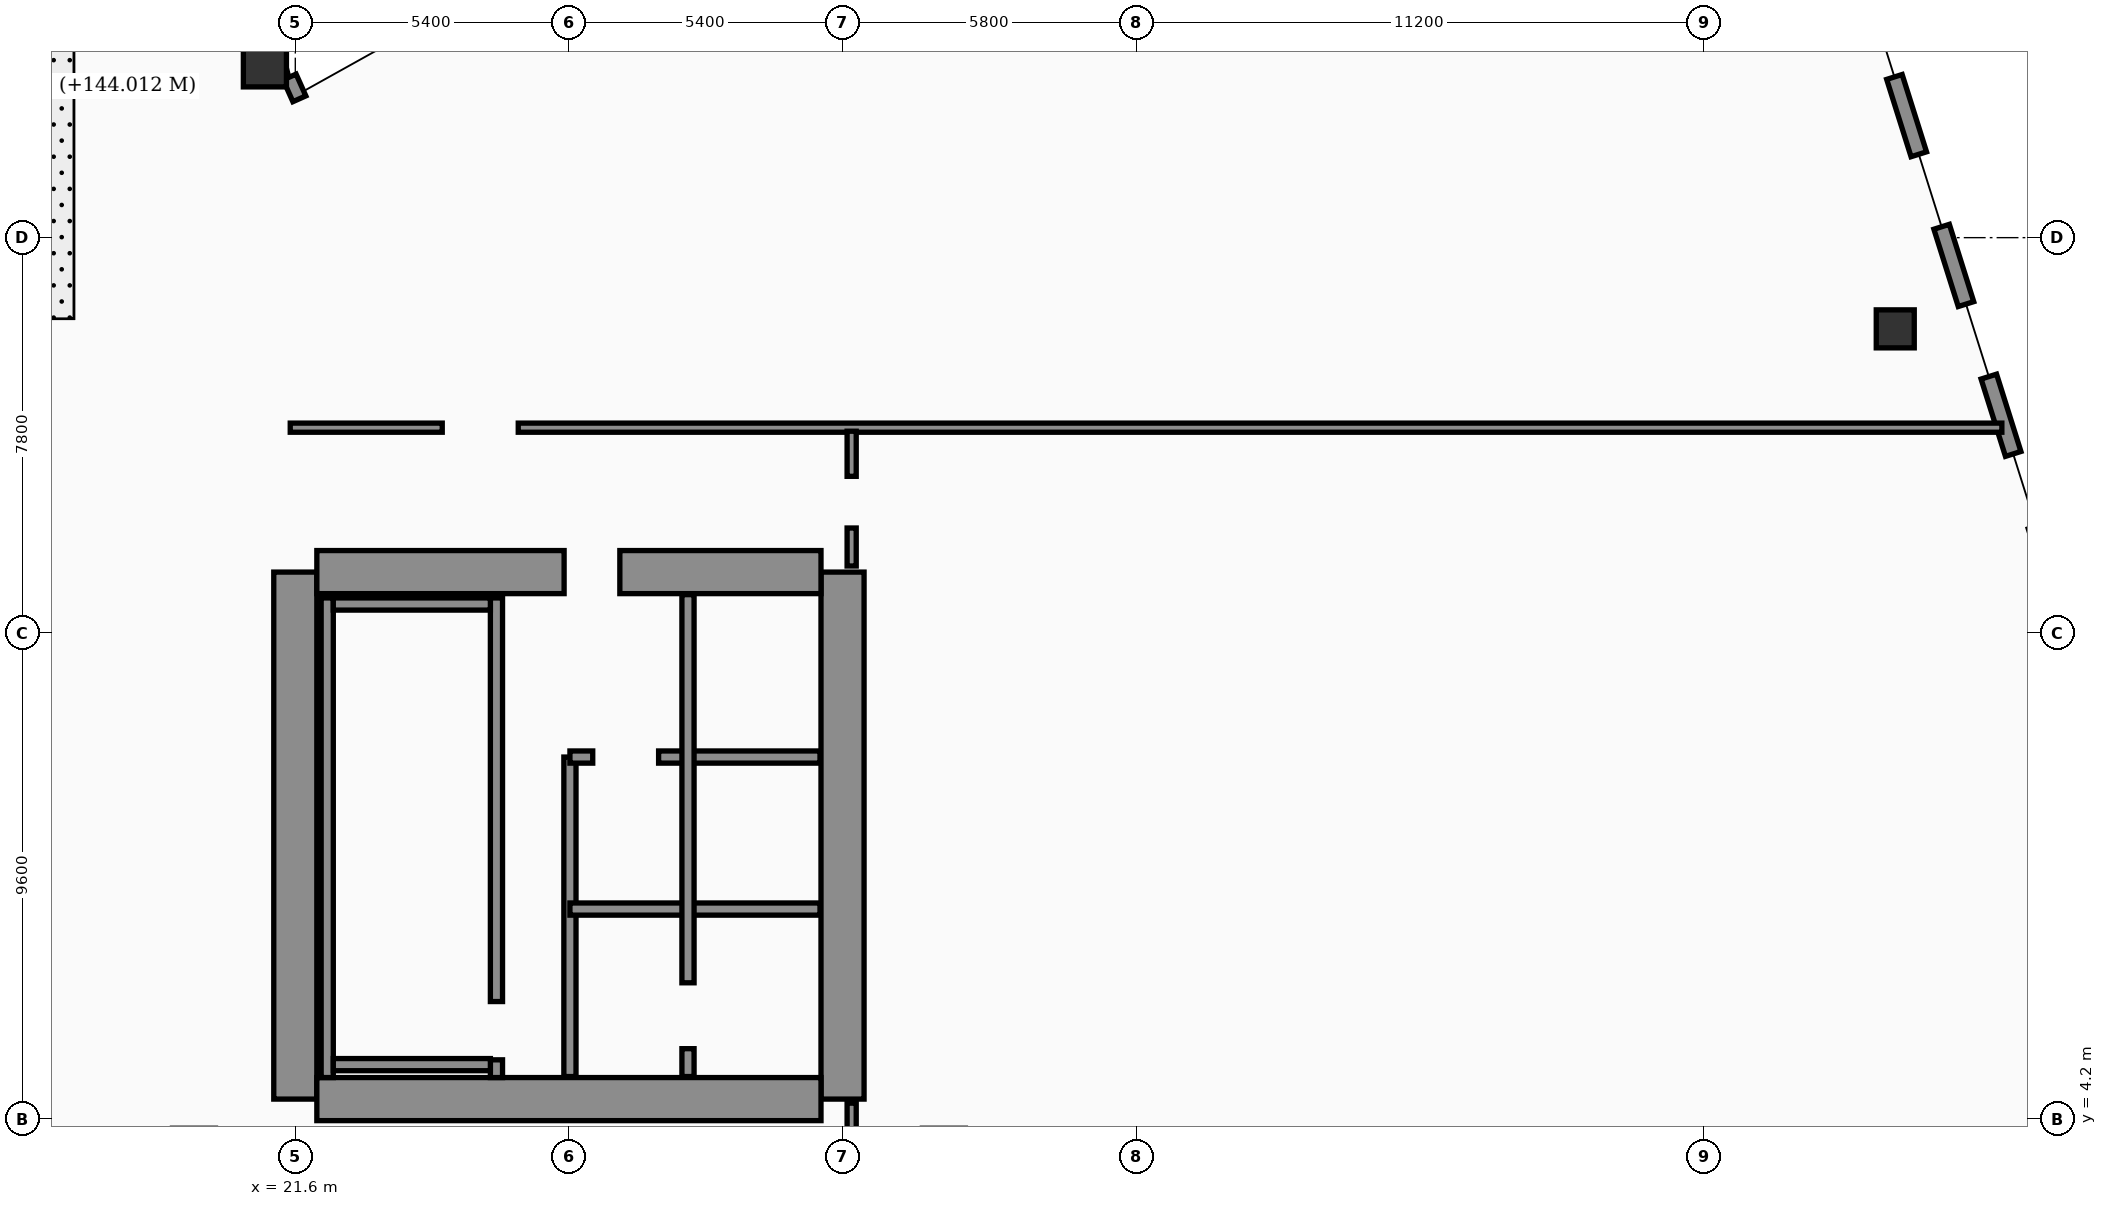
"""IFC4 building model, lengths in metres.
Left out: names, types, materials, properties, quantities, classifications, styles, units other than length and angle.
Written with IfcOpenShell. Run it as: python <this file> out.ifc"""

import sys

from ifc_helpers import new_model, si_unit, direction, frame, frame_2d, origin, origin_2d, place, context, subcontext, project, spatial, rectangle, hollow_rectangle, extrude, element, fill, save


model = new_model("IFC4")
c1 = context("Model", 3, precision=1e-05, world=origin(), true_north=direction((0.0, 1.0)))
c2 = subcontext(c1, "Body", "Model", "MODEL_VIEW")
j1 = project(units=[si_unit("LENGTHUNIT", "METRE"), si_unit("PLANEANGLEUNIT", "RADIAN")], contexts=[c1])
p1 = place(None, origin())
s1 = spatial("IfcSite", under=j1, at=p1, CompositionType="ELEMENT")
p2 = place(p1, origin())
s2 = spatial("IfcBuilding", under=s1, at=p2, CompositionType="ELEMENT")
p3 = place(p2, frame((0.0, 0.0, 144.0)))
s3 = spatial("IfcBuildingStorey", under=s2, at=p3, CompositionType="ELEMENT", Elevation=144.0)
for number, where, z_axis, x_axis in (
    (1, (21.6, 4.6, 0.0), (0.0, 0.0, 1.0), (0.0, 1.0, 0.0)),
    (2, (32.4, 4.6, 0.0), (0.0, 0.0, 1.0), (0.0, 1.0, 0.0)),
):
    element("IfcWall", number, at=place(p3, frame(where, z_axis=z_axis, x_axis=x_axis)), inside=s3, PredefinedType="SHEAR", context=c2, shape_type="SweptSolid", body=[
        extrude(rectangle(XDim=10.4, YDim=0.85, at=frame_2d((5.2, 0.0))), origin(), (0.0, 0.0, 1.0), 4.26),
    ])
p4 = place(p3, frame((22.025, 15.0, 0.0), z_axis=(0.0, 0.0, 1.0), x_axis=(1.0, 0.0, 0.0)))
e3 = element("IfcWall", 3, at=p4, inside=s3, PredefinedType="SHEAR", context=c2, shape_type="SweptSolid", body=[
    extrude(rectangle(XDim=9.95, YDim=0.85, at=frame_2d((4.975, 0.0))), origin(), (0.0, 0.0, 1.0), 4.26),
])
p5 = place(p4, frame((4.88, 0.0, 0.0)))
e4 = element("IfcOpeningElement", 4, at=p5, cuts=e3, PredefinedType="OPENING", context=c2, shape_type="SweptSolid", body=[
    extrude(rectangle(XDim=1.1, YDim=2.2, at=frame_2d((0.55, 1.1))), frame((0.0, 0.435, 0.0), z_axis=(0.0, -1.0, 0.0), x_axis=(1.0, 0.0, 0.0)), (0.0, 0.0, 1.0), 0.87),
])
p6 = place(p3, frame((22.025, 4.6, 0.0), z_axis=(0.0, 0.0, 1.0), x_axis=(1.0, 0.0, 0.0)))
e5 = element("IfcWall", 5, at=p6, inside=s3, PredefinedType="SHEAR", context=c2, shape_type="SweptSolid", body=[
    extrude(rectangle(XDim=9.95, YDim=0.85, at=frame_2d((4.975, 0.0))), origin(), (0.0, 0.0, 1.0), 4.26),
])
p7 = place(p3, frame((22.23, 5.025, 0.0), z_axis=(0.0, 0.0, 1.0), x_axis=(0.0, 1.0, 0.0)))
e6 = element("IfcWall", 6, at=p7, inside=s3, PredefinedType="SOLIDWALL", context=c2, shape_type="SweptSolid", body=[
    extrude(rectangle(XDim=9.465, YDim=0.24, at=frame_2d((4.732, 0.0))), origin(), (0.0, 0.0, 1.0), 4.26),
])
p8 = place(p3, frame((25.57, 5.025, 0.0), z_axis=(0.0, 0.0, 1.0), x_axis=(0.0, 1.0, 0.0)))
e7 = element("IfcWall", 7, at=p8, inside=s3, PredefinedType="SOLIDWALL", context=c2, shape_type="SweptSolid", body=[
    extrude(rectangle(XDim=9.465, YDim=0.24, at=frame_2d((4.732, 0.0))), origin(), (0.0, 0.0, 1.0), 4.26),
])
p9 = place(p8, frame((0.35, 0.0, 0.0)))
e8 = element("IfcOpeningElement", 8, at=p9, cuts=e7, PredefinedType="OPENING", context=c2, shape_type="SweptSolid", body=[
    extrude(rectangle(XDim=1.15, YDim=2.2, at=frame_2d((0.575, 1.1))), frame((0.0, 0.13, 0.0), z_axis=(0.0, -1.0, 0.0), x_axis=(1.0, 0.0, 0.0)), (0.0, 0.0, 1.0), 0.26),
])
for number, where, z_axis, x_axis in (
    (9, (22.35, 5.28, 0.0), (0.0, 0.0, 1.0), (1.0, 0.0, 0.0)),
    (10, (22.35, 14.37, 0.0), (0.0, 0.0, 1.0), (1.0, 0.0, 0.0)),
):
    element("IfcWall", number, at=place(p3, frame(where, z_axis=z_axis, x_axis=x_axis)), inside=s3, PredefinedType="SOLIDWALL", context=c2, shape_type="SweptSolid", body=[
        extrude(rectangle(XDim=3.1, YDim=0.24, at=frame_2d((1.55, 0.0))), origin(), (0.0, 0.0, 1.0), 4.26),
    ])
p10 = place(p3, frame((21.0, 25.0, 0.0), z_axis=(0.0, 0.0, 1.0), x_axis=(1.0, 0.0, 0.0)))
e11 = element("IfcColumn", 11, at=p10, inside=s3, PredefinedType="COLUMN", context=c2, shape_type="SweptSolid", body=[
    extrude(hollow_rectangle(XDim=0.85, YDim=0.85, WallThickness=0.036, at=origin_2d()), origin(), (0.0, 0.0, 1.0), 4.26),
])
p11 = place(p3, frame((53.176, 19.8, 0.0), z_axis=(0.0, 0.0, 1.0), x_axis=(1.0, 0.0, 0.0)))
e12 = element("IfcColumn", 12, at=p11, inside=s3, PredefinedType="COLUMN", context=c2, shape_type="SweptSolid", body=[
    extrude(hollow_rectangle(XDim=0.75, YDim=0.75, WallThickness=0.032, at=origin_2d()), origin(), (0.0, 0.0, 1.0), 4.26),
])
p12 = place(p3, frame((21.68, 24.34, 0.0), z_axis=(0.0, 0.0, 1.0), x_axis=(-0.40758134973, 0.913168901875, 0.0)))
e13 = element("IfcWall", 13, at=p12, inside=s3, PredefinedType="SOLIDWALL", context=c2, shape_type="SweptSolid", body=[
    extrude(rectangle(XDim=0.471, YDim=0.28, at=frame_2d((0.235, 0.0))), origin(), (0.0, 0.0, 1.0), 4.26),
])
p13 = place(p3, frame((59.23, 5.505, 0.0), z_axis=(0.0, 0.0, 1.0), x_axis=(-0.300509063924, 0.953778958931, 0.0)))
e14 = element("IfcWall", 14, at=p13, inside=s3, PredefinedType="SOLIDWALL", context=c2, shape_type="SweptSolid", body=[
    extrude(rectangle(XDim=30.814, YDim=0.32, at=frame_2d((15.407, 0.0))), origin(), (0.0, 0.0, 1.0), 4.26),
])
p14 = place(p13, frame((1.6, 0.0, 0.75)))
e15 = element("IfcOpeningElement", 15, at=p14, cuts=e14, PredefinedType="OPENING", context=c2, shape_type="SweptSolid", body=[
    extrude(rectangle(XDim=1.5, YDim=1.6, at=frame_2d((0.75, 0.8))), frame((0.0, 0.17, 0.0), z_axis=(0.0, -1.0, 0.0), x_axis=(1.0, 0.0, 0.0)), (0.0, 0.0, 1.0), 0.34),
])
p15 = place(p13, frame((4.7, 0.0, 0.75)))
e16 = element("IfcOpeningElement", 16, at=p15, cuts=e14, PredefinedType="OPENING", context=c2, shape_type="SweptSolid", body=[
    extrude(rectangle(XDim=1.5, YDim=1.6, at=frame_2d((0.75, 0.8))), frame((0.0, 0.17, 0.0), z_axis=(0.0, -1.0, 0.0), x_axis=(1.0, 0.0, 0.0)), (0.0, 0.0, 1.0), 0.34),
])
p16 = place(p13, frame((7.8, 0.0, 0.75)))
e17 = element("IfcOpeningElement", 17, at=p16, cuts=e14, PredefinedType="OPENING", context=c2, shape_type="SweptSolid", body=[
    extrude(rectangle(XDim=1.5, YDim=1.6, at=frame_2d((0.75, 0.8))), frame((0.0, 0.17, 0.0), z_axis=(0.0, -1.0, 0.0), x_axis=(1.0, 0.0, 0.0)), (0.0, 0.0, 1.0), 0.34),
])
p17 = place(p13, frame((10.9, 0.0, 0.75)))
e18 = element("IfcOpeningElement", 18, at=p17, cuts=e14, PredefinedType="OPENING", context=c2, shape_type="SweptSolid", body=[
    extrude(rectangle(XDim=1.5, YDim=1.6, at=frame_2d((0.75, 0.8))), frame((0.0, 0.17, 0.0), z_axis=(0.0, -1.0, 0.0), x_axis=(1.0, 0.0, 0.0)), (0.0, 0.0, 1.0), 0.34),
])
p18 = place(p13, frame((14.0, 0.0, 0.75)))
e19 = element("IfcOpeningElement", 19, at=p18, cuts=e14, PredefinedType="OPENING", context=c2, shape_type="SweptSolid", body=[
    extrude(rectangle(XDim=1.5, YDim=1.6, at=frame_2d((0.75, 0.8))), frame((0.0, 0.17, 0.0), z_axis=(0.0, -1.0, 0.0), x_axis=(1.0, 0.0, 0.0)), (0.0, 0.0, 1.0), 0.34),
])
p19 = place(p13, frame((17.1, 0.0, 0.75)))
e20 = element("IfcOpeningElement", 20, at=p19, cuts=e14, PredefinedType="OPENING", context=c2, shape_type="SweptSolid", body=[
    extrude(rectangle(XDim=1.5, YDim=1.6, at=frame_2d((0.75, 0.8))), frame((0.0, 0.17, 0.0), z_axis=(0.0, -1.0, 0.0), x_axis=(1.0, 0.0, 0.0)), (0.0, 0.0, 1.0), 0.34),
])
p20 = place(p13, frame((20.2, 0.0, 0.75)))
e21 = element("IfcOpeningElement", 21, at=p20, cuts=e14, PredefinedType="OPENING", context=c2, shape_type="SweptSolid", body=[
    extrude(rectangle(XDim=1.5, YDim=1.6, at=frame_2d((0.75, 0.8))), frame((0.0, 0.17, 0.0), z_axis=(0.0, -1.0, 0.0), x_axis=(1.0, 0.0, 0.0)), (0.0, 0.0, 1.0), 0.34),
])
p21 = place(p13, frame((23.3, 0.0, 0.75)))
e22 = element("IfcOpeningElement", 22, at=p21, cuts=e14, PredefinedType="OPENING", context=c2, shape_type="SweptSolid", body=[
    extrude(rectangle(XDim=1.5, YDim=1.6, at=frame_2d((0.75, 0.8))), frame((0.0, 0.17, 0.0), z_axis=(0.0, -1.0, 0.0), x_axis=(1.0, 0.0, 0.0)), (0.0, 0.0, 1.0), 0.34),
])
p22 = place(p13, frame((26.4, 0.0, 0.75)))
e23 = element("IfcOpeningElement", 23, at=p22, cuts=e14, PredefinedType="OPENING", context=c2, shape_type="SweptSolid", body=[
    extrude(rectangle(XDim=1.5, YDim=1.6, at=frame_2d((0.75, 0.8))), frame((0.0, 0.17, 0.0), z_axis=(0.0, -1.0, 0.0), x_axis=(1.0, 0.0, 0.0)), (0.0, 0.0, 1.0), 0.34),
])
p23 = place(p3, frame((27.02, 5.045, 0.0), z_axis=(0.0, 0.0, 1.0), x_axis=(0.0, 1.0, 0.0)))
e24 = element("IfcWall", 24, at=p23, inside=s3, PredefinedType="SOLIDWALL", context=c2, shape_type="SweptSolid", body=[
    extrude(rectangle(XDim=6.305, YDim=0.24, at=frame_2d((3.153, 0.0))), origin(), (0.0, 0.0, 1.0), 4.26),
])
p24 = place(p3, frame((27.02, 11.35, 0.0), z_axis=(0.0, 0.0, 1.0), x_axis=(1.0, 0.0, 0.0)))
e25 = element("IfcWall", 25, at=p24, inside=s3, PredefinedType="SOLIDWALL", context=c2, shape_type="SweptSolid", body=[
    extrude(rectangle(XDim=4.935, YDim=0.24, at=frame_2d((2.468, 0.0))), origin(), (0.0, 0.0, 1.0), 4.26),
])
p25 = place(p24, frame((0.45, 0.0, 0.0)))
e26 = element("IfcOpeningElement", 26, at=p25, cuts=e25, PredefinedType="OPENING", context=c2, shape_type="SweptSolid", body=[
    extrude(rectangle(XDim=1.3, YDim=2.35, at=frame_2d((0.65, 1.175))), frame((0.0, 0.13, 0.0), z_axis=(0.0, -1.0, 0.0), x_axis=(1.0, 0.0, 0.0)), (0.0, 0.0, 1.0), 0.26),
])
p26 = place(p3, frame((27.02, 8.35, 0.0), z_axis=(0.0, 0.0, 1.0), x_axis=(1.0, 0.0, 0.0)))
e27 = element("IfcWall", 27, at=p26, inside=s3, PredefinedType="SOLIDWALL", context=c2, shape_type="SweptSolid", body=[
    extrude(rectangle(XDim=4.935, YDim=0.24, at=frame_2d((2.468, 0.0))), origin(), (0.0, 0.0, 1.0), 3.79),
])
p27 = place(p3, frame((29.35, 5.045, 0.0), z_axis=(0.0, 0.0, 1.0), x_axis=(0.0, 1.0, 0.0)))
e28 = element("IfcWall", 28, at=p27, inside=s3, PredefinedType="SOLIDWALL", context=c2, shape_type="SweptSolid", body=[
    extrude(rectangle(XDim=9.51, YDim=0.24, at=frame_2d((4.755, 0.0))), origin(), (0.0, 0.0, 1.0), 4.26),
])
p28 = place(p27, frame((0.55, 0.0, 0.0)))
e29 = element("IfcOpeningElement", 29, at=p28, cuts=e28, PredefinedType="OPENING", context=c2, shape_type="SweptSolid", body=[
    extrude(rectangle(XDim=1.3, YDim=2.35, at=frame_2d((0.65, 1.175))), frame((0.0, 0.13, 0.0), z_axis=(0.0, -1.0, 0.0), x_axis=(1.0, 0.0, 0.0)), (0.0, 0.0, 1.0), 0.26),
])
p29 = place(p3, frame((21.5, 17.85, 0.0), z_axis=(0.0, 0.0, 1.0), x_axis=(1.0, 0.0, 0.0)))
e30 = element("IfcWall", 30, at=p29, inside=s3, PredefinedType="PARTITIONING", context=c2, shape_type="SweptSolid", body=[
    extrude(rectangle(XDim=33.78, YDim=0.18, at=frame_2d((16.89, 0.0))), origin(), (0.0, 0.0, 1.0), 3.64),
])
p30 = place(p29, frame((3.0, 0.0, 0.0)))
e31 = element("IfcOpeningElement", 31, at=p30, cuts=e30, PredefinedType="OPENING", context=c2, shape_type="SweptSolid", body=[
    extrude(rectangle(XDim=1.5, YDim=2.22, at=frame_2d((0.75, 1.11))), frame((0.0, 0.1, 0.0), z_axis=(0.0, -1.0, 0.0), x_axis=(1.0, 0.0, 0.0)), (0.0, 0.0, 1.0), 0.2),
])
p31 = place(p3, frame((32.58, 15.12, 0.0), z_axis=(0.0, 0.0, 1.0), x_axis=(0.0, 1.0, 0.0)))
e32 = element("IfcWall", 32, at=p31, inside=s3, PredefinedType="PARTITIONING", context=c2, shape_type="SweptSolid", body=[
    extrude(rectangle(XDim=2.66, YDim=0.18, at=frame_2d((1.33, 0.0))), origin(), (0.0, 0.0, 1.0), 3.64),
])
p32 = place(p31, frame((0.75, 0.0, 0.0)))
e33 = element("IfcOpeningElement", 33, at=p32, cuts=e32, PredefinedType="OPENING", context=c2, shape_type="SweptSolid", body=[
    extrude(rectangle(XDim=1.02, YDim=2.2, at=frame_2d((0.51, 1.1))), frame((0.0, 0.1, 0.0), z_axis=(0.0, -1.0, 0.0), x_axis=(1.0, 0.0, 0.0)), (0.0, 0.0, 1.0), 0.2),
])
p33 = place(p3, frame((32.58, 2.6, 0.0), z_axis=(0.0, 0.0, 1.0), x_axis=(0.0, 1.0, 0.0)))
e34 = element("IfcWall", 34, at=p33, inside=s3, PredefinedType="PARTITIONING", context=c2, shape_type="SweptSolid", body=[
    extrude(rectangle(XDim=1.92, YDim=0.18, at=frame_2d((0.96, 0.0))), origin(), (0.0, 0.0, 1.0), 3.64),
])
p34 = place(p17, origin())
e35 = element("IfcWindow", 35, at=p34, inside=s3, PartitioningType="SINGLE_PANEL", PredefinedType="WINDOW", context=c2, shape_type="SweptSolid", body=[
    extrude(rectangle(XDim=1.5, YDim=1.6, at=frame_2d((0.75, 0.8))), frame((0.0, 0.03, 0.0), z_axis=(0.0, -1.0, 0.0), x_axis=(1.0, 0.0, 0.0)), (0.0, 0.0, 1.0), 0.06),
])
fill(e18, e35)
p35 = place(p18, origin())
e36 = element("IfcWindow", 36, at=p35, inside=s3, PartitioningType="SINGLE_PANEL", PredefinedType="WINDOW", context=c2, shape_type="SweptSolid", body=[
    extrude(rectangle(XDim=1.5, YDim=1.6, at=frame_2d((0.75, 0.8))), frame((0.0, 0.03, 0.0), z_axis=(0.0, -1.0, 0.0), x_axis=(1.0, 0.0, 0.0)), (0.0, 0.0, 1.0), 0.06),
])
fill(e19, e36)
p36 = place(p19, origin())
e37 = element("IfcWindow", 37, at=p36, inside=s3, PartitioningType="SINGLE_PANEL", PredefinedType="WINDOW", context=c2, shape_type="SweptSolid", body=[
    extrude(rectangle(XDim=1.5, YDim=1.6, at=frame_2d((0.75, 0.8))), frame((0.0, 0.03, 0.0), z_axis=(0.0, -1.0, 0.0), x_axis=(1.0, 0.0, 0.0)), (0.0, 0.0, 1.0), 0.06),
])
fill(e20, e37)
p37 = place(p20, origin())
e38 = element("IfcWindow", 38, at=p37, inside=s3, PartitioningType="SINGLE_PANEL", PredefinedType="WINDOW", context=c2, shape_type="SweptSolid", body=[
    extrude(rectangle(XDim=1.5, YDim=1.6, at=frame_2d((0.75, 0.8))), frame((0.0, 0.03, 0.0), z_axis=(0.0, -1.0, 0.0), x_axis=(1.0, 0.0, 0.0)), (0.0, 0.0, 1.0), 0.06),
])
fill(e21, e38)
p38 = place(p25, origin())
e39 = element("IfcDoor", 39, at=p38, inside=s3, OperationType="DOUBLE_DOOR_SLIDING", PredefinedType="DOOR", context=c2, shape_type="SweptSolid", body=[
    extrude(rectangle(XDim=1.3, YDim=2.35, at=frame_2d((0.65, 1.175))), frame((0.0, 0.025, 0.0), z_axis=(0.0, -1.0, 0.0), x_axis=(1.0, 0.0, 0.0)), (0.0, 0.0, 1.0), 0.05),
])
fill(e26, e39)
p39 = place(p28, origin())
e40 = element("IfcDoor", 40, at=p39, inside=s3, OperationType="DOUBLE_DOOR_SLIDING", PredefinedType="DOOR", context=c2, shape_type="SweptSolid", body=[
    extrude(rectangle(XDim=1.3, YDim=2.35, at=frame_2d((0.65, 1.175))), frame((0.0, 0.025, 0.0), z_axis=(0.0, -1.0, 0.0), x_axis=(1.0, 0.0, 0.0)), (0.0, 0.0, 1.0), 0.05),
])
fill(e29, e40)
p40 = place(p30, origin())
e41 = element("IfcDoor", 41, at=p40, inside=s3, OperationType="SINGLE_SWING_LEFT", PredefinedType="DOOR", context=c2, shape_type="SweptSolid", body=[
    extrude(rectangle(XDim=1.5, YDim=2.22, at=frame_2d((0.75, 1.11))), frame((0.0, 0.025, 0.0), z_axis=(0.0, -1.0, 0.0), x_axis=(1.0, 0.0, 0.0)), (0.0, 0.0, 1.0), 0.05),
])
fill(e31, e41)
p41 = place(p32, origin())
e42 = element("IfcDoor", 42, at=p41, inside=s3, OperationType="SINGLE_SWING_RIGHT", PredefinedType="DOOR", context=c2, shape_type="SweptSolid", body=[
    extrude(rectangle(XDim=1.02, YDim=2.2, at=frame_2d((0.51, 1.1))), frame((0.0, 0.025, 0.0), z_axis=(0.0, -1.0, 0.0), x_axis=(1.0, 0.0, 0.0)), (0.0, 0.0, 1.0), 0.05),
])
fill(e33, e42)
p42 = place(p9, origin())
e43 = element("IfcDoor", 43, at=p42, inside=s3, OperationType="SINGLE_SWING_RIGHT", PredefinedType="DOOR", context=c2, shape_type="SweptSolid", body=[
    extrude(rectangle(XDim=1.15, YDim=2.2, at=frame_2d((0.575, 1.1))), frame((0.0, 0.025, 0.0), z_axis=(0.0, -1.0, 0.0), x_axis=(1.0, 0.0, 0.0)), (0.0, 0.0, 1.0), 0.05),
])
fill(e8, e43)
p43 = place(p5, origin())
e44 = element("IfcDoor", 44, at=p43, inside=s3, OperationType="SINGLE_SWING_LEFT", PredefinedType="DOOR", context=c2, shape_type="SweptSolid", body=[
    extrude(rectangle(XDim=1.1, YDim=2.2, at=frame_2d((0.55, 1.1))), frame((0.0, 0.025, 0.0), z_axis=(0.0, -1.0, 0.0), x_axis=(1.0, 0.0, 0.0)), (0.0, 0.0, 1.0), 0.05),
])
fill(e4, e44)
save(model, sys.argv[1])
